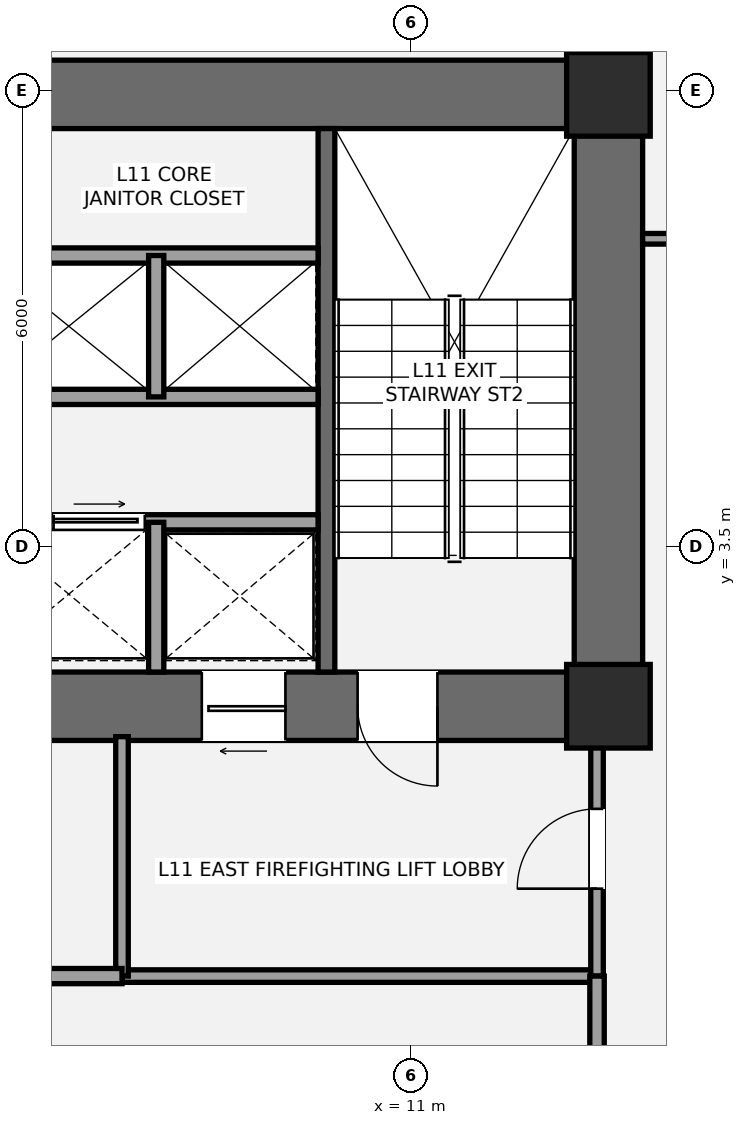
"""IFC4 building model, lengths in metres.
Left out: names, types, materials, properties, quantities, classifications, styles, units other than length and angle.
Written with IfcOpenShell. Run it as: python <this file> out.ifc"""

import sys

from ifc_helpers import new_model, si_unit, direction, frame, frame_2d, origin, origin_2d, place, context, subcontext, project, spatial, rectangle, extrude, element, fill, save


model = new_model("IFC4")
c1 = context("Model", 3, precision=1e-05, world=origin(), true_north=direction((0.0, 1.0)))
c2 = subcontext(c1, "Body", "Model", "MODEL_VIEW")
j1 = project(units=[si_unit("LENGTHUNIT", "METRE"), si_unit("PLANEANGLEUNIT", "RADIAN")], contexts=[c1])
p1 = place(None, origin())
s1 = spatial("IfcSite", under=j1, at=p1, CompositionType="ELEMENT")
p2 = place(p1, origin())
s2 = spatial("IfcBuilding", under=s1, at=p2, CompositionType="ELEMENT")
p3 = place(p2, frame((0.0, 0.0, 45.0)))
s3 = spatial("IfcBuildingStorey", under=s2, at=p3, CompositionType="ELEMENT", Elevation=45.0)
p4 = place(p3, frame((13.6, 0.95, 0.0), z_axis=(0.0, 0.0, 1.0), x_axis=(0.0, 1.0, 0.0)))
e1 = element("IfcWall", 1, at=p4, inside=s3, PredefinedType="SHEAR", context=c2, shape_type="SweptSolid", body=[
    extrude(rectangle(XDim=8.95, YDim=0.9, at=frame_2d((4.475, 0.0))), origin(), (0.0, 0.0, 1.0), 3.6),
])
p5 = place(p3, frame((4.35, 9.45, 0.0), z_axis=(0.0, 0.0, 1.0), x_axis=(1.0, 0.0, 0.0)))
e2 = element("IfcWall", 2, at=p5, inside=s3, PredefinedType="SHEAR", context=c2, shape_type="SweptSolid", body=[
    extrude(rectangle(XDim=9.7, YDim=0.9, at=frame_2d((4.85, 0.0))), origin(), (0.0, 0.0, 1.0), 3.6),
])
p6 = place(p3, frame((14.05, 1.4, 0.0), z_axis=(0.0, 0.0, 1.0), x_axis=(-1.0, 0.0, 0.0)))
e3 = element("IfcWall", 3, at=p6, inside=s3, PredefinedType="SHEAR", context=c2, shape_type="SweptSolid", body=[
    extrude(rectangle(XDim=9.3, YDim=0.9, at=frame_2d((4.65, 0.0))), origin(), (0.0, 0.0, 1.0), 3.6),
])
p7 = place(p6, frame((2.7, 0.0, 0.0)))
e4 = element("IfcOpeningElement", 4, at=p7, cuts=e3, PredefinedType="OPENING", context=c2, shape_type="SweptSolid", body=[
    extrude(rectangle(XDim=1.05, YDim=2.15, at=frame_2d((0.525, 1.075))), frame((0.0, 0.46, 0.0), z_axis=(0.0, -1.0, 0.0), x_axis=(1.0, 0.0, 0.0)), (0.0, 0.0, 1.0), 0.92),
])
p8 = place(p6, frame((4.7, 0.0, 0.0)))
e5 = element("IfcOpeningElement", 5, at=p8, cuts=e3, PredefinedType="OPENING", context=c2, shape_type="SweptSolid", body=[
    extrude(rectangle(XDim=1.1, YDim=2.2, at=frame_2d((0.55, 1.1))), frame((0.0, 0.46, 0.0), z_axis=(0.0, -1.0, 0.0), x_axis=(1.0, 0.0, 0.0)), (0.0, 0.0, 1.0), 0.92),
])
p9 = place(p3, frame((9.89, 1.85, 0.0), z_axis=(0.0, 0.0, 1.0), x_axis=(0.0, 1.0, 0.0)))
e6 = element("IfcWall", 6, at=p9, inside=s3, PredefinedType="SHEAR", context=c2, shape_type="SweptSolid", body=[
    extrude(rectangle(XDim=7.15, YDim=0.22, at=frame_2d((3.575, 0.0))), origin(), (0.0, 0.0, 1.0), 3.6),
])
for number, where, z_axis, x_axis in (
    (7, (13.6, 1.4, 0.0), (0.0, 0.0, 1.0), (1.0, 0.0, 0.0)),
    (8, (13.6, 9.45, 0.0), (0.0, 0.0, 1.0), (1.0, 0.0, 0.0)),
):
    element("IfcColumn", number, at=place(p3, frame(where, z_axis=z_axis, x_axis=x_axis)), inside=s3, PredefinedType="COLUMN", context=c2, shape_type="SweptSolid", body=[
        extrude(rectangle(XDim=1.1, YDim=1.1, at=origin_2d()), origin(), (0.0, 0.0, 1.0), 3.6),
    ])
p10 = place(p3, frame((7.2, -2.15, 0.0), z_axis=(0.0, 0.0, 1.0), x_axis=(1.0, 0.0, 0.0)))
e9 = element("IfcWall", 9, at=p10, inside=s3, PredefinedType="PARTITIONING", context=c2, shape_type="SweptSolid", body=[
    extrude(rectangle(XDim=6.25, YDim=0.165, at=frame_2d((3.125, 0.0))), origin(), (0.0, 0.0, 1.0), 3.4),
])
p11 = place(p3, frame((7.2, -2.15, 0.0), z_axis=(0.0, 0.0, 1.0), x_axis=(0.0, 1.0, 0.0)))
e10 = element("IfcWall", 10, at=p11, inside=s3, PredefinedType="PARTITIONING", context=c2, shape_type="SweptSolid", body=[
    extrude(rectangle(XDim=3.15, YDim=0.165, at=frame_2d((1.575, 0.0))), origin(), (0.0, 0.0, 1.0), 2.853),
])
p12 = place(p3, frame((13.45, -2.15, 0.0), z_axis=(0.0, 0.0, 1.0), x_axis=(0.0, 1.0, 0.0)))
e11 = element("IfcWall", 11, at=p12, inside=s3, PredefinedType="PARTITIONING", context=c2, shape_type="SweptSolid", body=[
    extrude(rectangle(XDim=3.15, YDim=0.165, at=frame_2d((1.575, 0.0))), origin(), (0.0, 0.0, 1.0), 2.853),
])
p13 = place(p12, frame((1.15, 0.0, 0.0)))
e12 = element("IfcOpeningElement", 12, at=p13, cuts=e11, PredefinedType="OPENING", context=c2, shape_type="SweptSolid", body=[
    extrude(rectangle(XDim=1.05, YDim=2.15, at=frame_2d((0.525, 1.075))), frame((0.0, 0.093, 0.0), z_axis=(0.0, -1.0, 0.0), x_axis=(1.0, 0.0, 0.0)), (0.0, 0.0, 1.0), 0.185),
])
p14 = place(p3, frame((4.95, -2.15, 0.0), z_axis=(0.0, 0.0, 1.0), x_axis=(1.0, 0.0, 0.0)))
e13 = element("IfcWall", 13, at=p14, inside=s3, PredefinedType="SOLIDWALL", context=c2, shape_type="SweptSolid", body=[
    extrude(rectangle(XDim=2.25, YDim=0.2, at=frame_2d((1.125, 0.0))), origin(), (0.0, 0.0, 1.0), 3.4),
])
p15 = place(p3, frame((5.65, 3.82, 0.0), z_axis=(0.0, 0.0, 1.0), x_axis=(1.0, 0.0, 0.0)))
e14 = element("IfcWall", 14, at=p15, inside=s3, PredefinedType="SOLIDWALL", context=c2, shape_type="SweptSolid", body=[
    extrude(rectangle(XDim=4.13, YDim=0.2, at=frame_2d((2.065, 0.0))), origin(), (0.0, 0.0, 1.0), 3.4),
])
p16 = place(p15, frame((0.65, 0.0, 0.0)))
e15 = element("IfcOpeningElement", 15, at=p16, cuts=e14, PredefinedType="OPENING", context=c2, shape_type="SweptSolid", body=[
    extrude(rectangle(XDim=1.2, YDim=2.2, at=frame_2d((0.6, 1.1))), frame((0.0, 0.11, 0.0), z_axis=(0.0, -1.0, 0.0), x_axis=(1.0, 0.0, 0.0)), (0.0, 0.0, 1.0), 0.22),
])
p17 = place(p3, frame((7.65, 1.85, 0.0), z_axis=(0.0, 0.0, 1.0), x_axis=(0.0, 1.0, 0.0)))
e16 = element("IfcWall", 16, at=p17, inside=s3, PredefinedType="SOLIDWALL", context=c2, shape_type="SweptSolid", body=[
    extrude(rectangle(XDim=1.97, YDim=0.2, at=frame_2d((0.985, 0.0))), origin(), (0.0, 0.0, 1.0), 3.4),
])
for number, where, z_axis, x_axis in (
    (17, (5.65, 5.47, 0.0), (0.0, 0.0, 1.0), (1.0, 0.0, 0.0)),
    (18, (5.65, 7.33, 0.0), (0.0, 0.0, 1.0), (1.0, 0.0, 0.0)),
):
    element("IfcWall", number, at=place(p3, frame(where, z_axis=z_axis, x_axis=x_axis)), inside=s3, PredefinedType="SOLIDWALL", context=c2, shape_type="SweptSolid", body=[
        extrude(rectangle(XDim=4.13, YDim=0.2, at=frame_2d((2.065, 0.0))), origin(), (0.0, 0.0, 1.0), 3.4),
    ])
p18 = place(p3, frame((7.65, 5.47, 0.0), z_axis=(0.0, 0.0, 1.0), x_axis=(0.0, 1.0, 0.0)))
e19 = element("IfcWall", 19, at=p18, inside=s3, PredefinedType="SOLIDWALL", context=c2, shape_type="SweptSolid", body=[
    extrude(rectangle(XDim=1.86, YDim=0.2, at=frame_2d((0.93, 0.0))), origin(), (0.0, 0.0, 1.0), 3.4),
])
p19 = place(p3, frame((13.45, -4.05, 0.0), z_axis=(0.0, 0.0, 1.0), x_axis=(0.0, 1.0, 0.0)))
e20 = element("IfcWall", 20, at=p19, inside=s3, PredefinedType="PLUMBINGWALL", context=c2, shape_type="SweptSolid", body=[
    extrude(rectangle(XDim=1.9, YDim=0.19, at=frame_2d((0.95, 0.0))), origin(), (0.0, 0.0, 1.0), 2.853),
])
p20 = place(p3, frame((14.05, 7.55, 0.0), z_axis=(0.0, 0.0, 1.0), x_axis=(1.0, 0.0, 0.0)))
e21 = element("IfcWall", 21, at=p20, inside=s3, PredefinedType="PARTITIONING", context=c2, shape_type="SweptSolid", body=[
    extrude(rectangle(XDim=10.806, YDim=0.14, at=frame_2d((5.403, 0.0))), origin(), (0.0, 0.0, 1.0), 2.853),
])
p21 = place(p20, frame((1.2, 0.0, 0.0)))
e22 = element("IfcOpeningElement", 22, at=p21, cuts=e21, PredefinedType="OPENING", context=c2, shape_type="SweptSolid", body=[
    extrude(rectangle(XDim=0.92, YDim=2.15, at=frame_2d((0.46, 1.075))), frame((0.0, 0.08, 0.0), z_axis=(0.0, -1.0, 0.0), x_axis=(1.0, 0.0, 0.0)), (0.0, 0.0, 1.0), 0.16),
])
p22 = place(p7, origin())
e23 = element("IfcDoor", 23, at=p22, inside=s3, OperationType="SINGLE_SWING_LEFT", PredefinedType="DOOR", context=c2, shape_type="SweptSolid", body=[
    extrude(rectangle(XDim=1.05, YDim=2.15, at=frame_2d((0.525, 1.075))), frame((0.0, 0.025, 0.0), z_axis=(0.0, -1.0, 0.0), x_axis=(1.0, 0.0, 0.0)), (0.0, 0.0, 1.0), 0.05),
])
fill(e4, e23)
p23 = place(p13, origin())
e24 = element("IfcDoor", 24, at=p23, inside=s3, OperationType="SINGLE_SWING_LEFT", PredefinedType="DOOR", context=c2, shape_type="SweptSolid", body=[
    extrude(rectangle(XDim=1.05, YDim=2.15, at=frame_2d((0.525, 1.075))), frame((0.0, 0.025, 0.0), z_axis=(0.0, -1.0, 0.0), x_axis=(1.0, 0.0, 0.0)), (0.0, 0.0, 1.0), 0.05),
])
fill(e12, e24)
p24 = place(p8, origin())
e25 = element("IfcDoor", 25, at=p24, inside=s3, OperationType="SLIDING_TO_LEFT", PredefinedType="DOOR", context=c2, shape_type="SweptSolid", body=[
    extrude(rectangle(XDim=1.1, YDim=2.2, at=frame_2d((0.55, 1.1))), frame((0.0, 0.025, 0.0), z_axis=(0.0, -1.0, 0.0), x_axis=(1.0, 0.0, 0.0)), (0.0, 0.0, 1.0), 0.05),
])
fill(e5, e25)
p25 = place(p16, origin())
e26 = element("IfcDoor", 26, at=p25, inside=s3, OperationType="SLIDING_TO_RIGHT", PredefinedType="DOOR", context=c2, shape_type="SweptSolid", body=[
    extrude(rectangle(XDim=1.2, YDim=2.2, at=frame_2d((0.6, 1.1))), frame((0.0, 0.025, 0.0), z_axis=(0.0, -1.0, 0.0), x_axis=(1.0, 0.0, 0.0)), (0.0, 0.0, 1.0), 0.05),
])
fill(e15, e26)
save(model, sys.argv[1])
